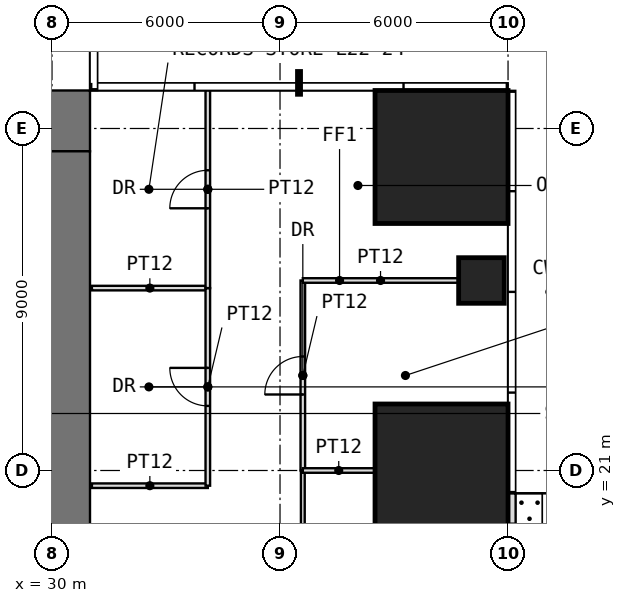
"""IFC4 building model, lengths in metres.
Left out: names, types, materials, properties, quantities, classifications, styles, units other than length and angle.
Written with IfcOpenShell. Run it as: python <this file> out.ifc"""

import sys

from ifc_helpers import new_model, si_unit, direction, frame, frame_2d, origin, origin_2d, place, context, subcontext, project, spatial, rectangle, extrude, element, fill, save


model = new_model("IFC4")
c1 = context("Model", 3, precision=1e-05, world=origin(), true_north=direction((0.0, 1.0)))
c2 = subcontext(c1, "Body", "Model", "MODEL_VIEW")
j1 = project(units=[si_unit("LENGTHUNIT", "METRE"), si_unit("PLANEANGLEUNIT", "RADIAN")], contexts=[c1])
p1 = place(None, origin())
s1 = spatial("IfcSite", under=j1, at=p1, CompositionType="ELEMENT")
p2 = place(p1, origin())
s2 = spatial("IfcBuilding", under=s1, at=p2, CompositionType="ELEMENT")
p3 = place(p2, frame((0.0, 0.0, 96.5)))
s3 = spatial("IfcBuildingStorey", under=s2, at=p3, CompositionType="ELEMENT", Elevation=96.5)
p4 = place(p3, frame((40.25, 21.0, 0.0), z_axis=(0.0, 0.0, 1.0), x_axis=(1.0, 0.0, 0.0)))
e1 = element("IfcColumn", 1, at=p4, inside=s3, PredefinedType="COLUMN", context=c2, shape_type="SweptSolid", body=[
    extrude(rectangle(XDim=3.5, YDim=3.5, at=origin_2d()), origin(), (0.0, 0.0, 1.0), 4.0),
])
p5 = place(p3, frame((41.3, 26.0, 0.0), z_axis=(0.0, 0.0, 1.0), x_axis=(1.0, 0.0, 0.0)))
e2 = element("IfcColumn", 2, at=p5, inside=s3, PredefinedType="COLUMN", context=c2, shape_type="SweptSolid", body=[
    extrude(rectangle(XDim=1.2, YDim=1.2, at=origin_2d()), origin(), (0.0, 0.0, 1.0), 4.0),
])
p6 = place(p3, frame((40.25, 29.25, 0.0), z_axis=(0.0, 0.0, 1.0), x_axis=(1.0, 0.0, 0.0)))
e3 = element("IfcColumn", 3, at=p6, inside=s3, PredefinedType="COLUMN", context=c2, shape_type="SweptSolid", body=[
    extrude(rectangle(XDim=3.5, YDim=3.5, at=origin_2d()), origin(), (0.0, 0.0, 1.0), 4.0),
])
p7 = place(p3, frame((42.1, 16.6, 0.0), z_axis=(0.0, 0.0, 1.0), x_axis=(0.0, 1.0, 0.0)))
e4 = element("IfcWall", 4, at=p7, inside=s3, PredefinedType="USERDEFINED", context=c2, shape_type="SweptSolid", body=[
    extrude(rectangle(XDim=3.8, YDim=0.2, at=frame_2d((1.9, 0.0))), origin(), (0.0, 0.0, 1.0), 3.75),
])
p8 = place(p7, frame((0.3, 0.0, 0.0)))
e5 = element("IfcOpeningElement", 5, at=p8, cuts=e4, PredefinedType="OPENING", context=c2, shape_type="SweptSolid", body=[
    extrude(rectangle(XDim=1.0, YDim=2.4, at=frame_2d((0.5, 1.2))), frame((0.0, 0.11, 0.0), z_axis=(0.0, -1.0, 0.0), x_axis=(1.0, 0.0, 0.0)), (0.0, 0.0, 1.0), 0.22),
])
p9 = place(p7, frame((1.6, 0.0, 0.3)))
e6 = element("IfcOpeningElement", 6, at=p9, cuts=e4, PredefinedType="OPENING", context=c2, shape_type="SweptSolid", body=[
    extrude(rectangle(XDim=1.4, YDim=2.7, at=frame_2d((0.7, 1.35))), frame((0.0, 0.11, 0.0), z_axis=(0.0, -1.0, 0.0), x_axis=(1.0, 0.0, 0.0)), (0.0, 0.0, 1.0), 0.22),
])
p10 = place(p3, frame((11.0, 30.2, -0.05), z_axis=(0.0, 0.0, 1.0), x_axis=(1.0, 0.0, 0.0)))
e7 = element("IfcWall", 7, at=p10, inside=s3, PredefinedType="SHEAR", context=c2, shape_type="SweptSolid", body=[
    extrude(rectangle(XDim=20.0, YDim=1.6, at=frame_2d((10.0, 0.0))), origin(), (0.0, 0.0, 1.0), 4.0),
])
p11 = place(p10, frame((9.0, 0.0, 0.05)))
e8 = element("IfcOpeningElement", 8, at=p11, cuts=e7, PredefinedType="OPENING", context=c2, shape_type="SweptSolid", body=[
    extrude(rectangle(XDim=2.0, YDim=2.2, at=frame_2d((1.0, 1.1))), frame((0.0, 0.81, 0.0), z_axis=(0.0, -1.0, 0.0), x_axis=(1.0, 0.0, 0.0)), (0.0, 0.0, 1.0), 1.62),
])
p12 = place(p3, frame((30.2, 12.6, -0.05), z_axis=(0.0, 0.0, 1.0), x_axis=(0.0, 1.0, 0.0)))
e9 = element("IfcWall", 9, at=p12, inside=s3, PredefinedType="SHEAR", context=c2, shape_type="SweptSolid", body=[
    extrude(rectangle(XDim=16.8, YDim=1.6, at=frame_2d((8.4, 0.0))), origin(), (0.0, 0.0, 1.0), 4.0),
])
p13 = place(p12, frame((5.9, 0.0, 0.05)))
e10 = element("IfcOpeningElement", 10, at=p13, cuts=e9, PredefinedType="OPENING", context=c2, shape_type="SweptSolid", body=[
    extrude(rectangle(XDim=1.0, YDim=2.2, at=frame_2d((0.5, 1.1))), frame((0.0, 0.81, 0.0), z_axis=(0.0, -1.0, 0.0), x_axis=(1.0, 0.0, 0.0)), (0.0, 0.0, 1.0), 1.62),
])
for number, where, z_axis, x_axis in (
    (11, (31.05, 20.6, 0.0), (0.0, 0.0, 1.0), (1.0, 0.0, 0.0)),
    (12, (31.05, 25.8, 0.0), (0.0, 0.0, 1.0), (1.0, 0.0, 0.0)),
):
    element("IfcWall", number, at=place(p3, frame(where, z_axis=z_axis, x_axis=x_axis)), inside=s3, PredefinedType="PARTITIONING", context=c2, shape_type="SweptSolid", body=[
        extrude(rectangle(XDim=3.05, YDim=0.12, at=frame_2d((1.525, 0.0))), origin(), (0.0, 0.0, 1.0), 3.75),
    ])
p14 = place(p3, frame((34.1, 20.6, 0.0), z_axis=(0.0, 0.0, 1.0), x_axis=(0.0, 1.0, 0.0)))
e13 = element("IfcWall", 13, at=p14, inside=s3, PredefinedType="PARTITIONING", context=c2, shape_type="SweptSolid", body=[
    extrude(rectangle(XDim=5.2, YDim=0.12, at=frame_2d((2.6, 0.0))), origin(), (0.0, 0.0, 1.0), 3.75),
])
p15 = place(p14, frame((2.1, 0.0, 0.0)))
e14 = element("IfcOpeningElement", 14, at=p15, cuts=e13, PredefinedType="OPENING", context=c2, shape_type="SweptSolid", body=[
    extrude(rectangle(XDim=1.0, YDim=2.2, at=frame_2d((0.5, 1.1))), frame((0.0, 0.07, 0.0), z_axis=(0.0, -1.0, 0.0), x_axis=(1.0, 0.0, 0.0)), (0.0, 0.0, 1.0), 0.14),
])
p16 = place(p3, frame((34.1, 25.8, 0.0), z_axis=(0.0, 0.0, 1.0), x_axis=(0.0, 1.0, 0.0)))
e15 = element("IfcWall", 15, at=p16, inside=s3, PredefinedType="PARTITIONING", context=c2, shape_type="SweptSolid", body=[
    extrude(rectangle(XDim=5.2, YDim=0.12, at=frame_2d((2.6, 0.0))), origin(), (0.0, 0.0, 1.0), 3.75),
])
p17 = place(p16, frame((2.1, 0.0, 0.0)))
e16 = element("IfcOpeningElement", 16, at=p17, cuts=e15, PredefinedType="OPENING", context=c2, shape_type="SweptSolid", body=[
    extrude(rectangle(XDim=1.0, YDim=2.2, at=frame_2d((0.5, 1.1))), frame((0.0, 0.07, 0.0), z_axis=(0.0, -1.0, 0.0), x_axis=(1.0, 0.0, 0.0)), (0.0, 0.0, 1.0), 0.14),
])
p18 = place(p3, frame((36.6, 16.0, 0.0), z_axis=(0.0, 0.0, 1.0), x_axis=(0.0, 1.0, 0.0)))
e17 = element("IfcWall", 17, at=p18, inside=s3, PredefinedType="PARTITIONING", context=c2, shape_type="SweptSolid", body=[
    extrude(rectangle(XDim=5.0, YDim=0.1, at=frame_2d((2.5, 0.0))), origin(), (0.0, 0.0, 1.0), 3.75),
])
p19 = place(p18, frame((2.0, 0.0, 0.0)))
e18 = element("IfcOpeningElement", 18, at=p19, cuts=e17, PredefinedType="OPENING", context=c2, shape_type="SweptSolid", body=[
    extrude(rectangle(XDim=1.0, YDim=2.4, at=frame_2d((0.5, 1.2))), frame((0.0, 0.06, 0.0), z_axis=(0.0, -1.0, 0.0), x_axis=(1.0, 0.0, 0.0)), (0.0, 0.0, 1.0), 0.12),
])
p20 = place(p3, frame((36.6, 21.0, 0.0), z_axis=(0.0, 0.0, 1.0), x_axis=(0.0, 1.0, 0.0)))
e19 = element("IfcWall", 19, at=p20, inside=s3, PredefinedType="PARTITIONING", context=c2, shape_type="SweptSolid", body=[
    extrude(rectangle(XDim=5.0, YDim=0.12, at=frame_2d((2.5, 0.0))), origin(), (0.0, 0.0, 1.0), 3.75),
])
p21 = place(p20, frame((2.0, 0.0, 0.0)))
e20 = element("IfcOpeningElement", 20, at=p21, cuts=e19, PredefinedType="OPENING", context=c2, shape_type="SweptSolid", body=[
    extrude(rectangle(XDim=1.0, YDim=2.2, at=frame_2d((0.5, 1.1))), frame((0.0, 0.07, 0.0), z_axis=(0.0, -1.0, 0.0), x_axis=(1.0, 0.0, 0.0)), (0.0, 0.0, 1.0), 0.14),
])
p22 = place(p3, frame((36.6, 21.0, 0.0), z_axis=(0.0, 0.0, 1.0), x_axis=(1.0, 0.0, 0.0)))
e21 = element("IfcWall", 21, at=p22, inside=s3, PredefinedType="PARTITIONING", context=c2, shape_type="SweptSolid", body=[
    extrude(rectangle(XDim=1.89, YDim=0.12, at=frame_2d((0.945, 0.0))), origin(), (0.0, 0.0, 1.0), 3.75),
])
p23 = place(p3, frame((36.6, 26.0, 0.0), z_axis=(0.0, 0.0, 1.0), x_axis=(1.0, 0.0, 0.0)))
e22 = element("IfcWall", 22, at=p23, inside=s3, PredefinedType="PARTITIONING", context=c2, shape_type="SweptSolid", body=[
    extrude(rectangle(XDim=4.09, YDim=0.12, at=frame_2d((2.045, 0.0))), origin(), (0.0, 0.0, 1.0), 3.75),
])
p24 = place(p15, origin())
e23 = element("IfcDoor", 23, at=p24, inside=s3, OperationType="SINGLE_SWING_RIGHT", PredefinedType="DOOR", context=c2, shape_type="SweptSolid", body=[
    extrude(rectangle(XDim=1.0, YDim=2.2, at=frame_2d((0.5, 1.1))), frame((0.0, 0.025, 0.0), z_axis=(0.0, -1.0, 0.0), x_axis=(1.0, 0.0, 0.0)), (0.0, 0.0, 1.0), 0.05),
])
fill(e14, e23)
p25 = place(p17, origin())
e24 = element("IfcDoor", 24, at=p25, inside=s3, OperationType="SINGLE_SWING_LEFT", PredefinedType="DOOR", context=c2, shape_type="SweptSolid", body=[
    extrude(rectangle(XDim=1.0, YDim=2.2, at=frame_2d((0.5, 1.1))), frame((0.0, 0.025, 0.0), z_axis=(0.0, -1.0, 0.0), x_axis=(1.0, 0.0, 0.0)), (0.0, 0.0, 1.0), 0.05),
])
fill(e16, e24)
p26 = place(p21, origin())
e25 = element("IfcDoor", 25, at=p26, inside=s3, OperationType="SINGLE_SWING_LEFT", PredefinedType="DOOR", context=c2, shape_type="SweptSolid", body=[
    extrude(rectangle(XDim=1.0, YDim=2.2, at=frame_2d((0.5, 1.1))), frame((0.0, 0.025, 0.0), z_axis=(0.0, -1.0, 0.0), x_axis=(1.0, 0.0, 0.0)), (0.0, 0.0, 1.0), 0.05),
])
fill(e20, e25)
save(model, sys.argv[1])
